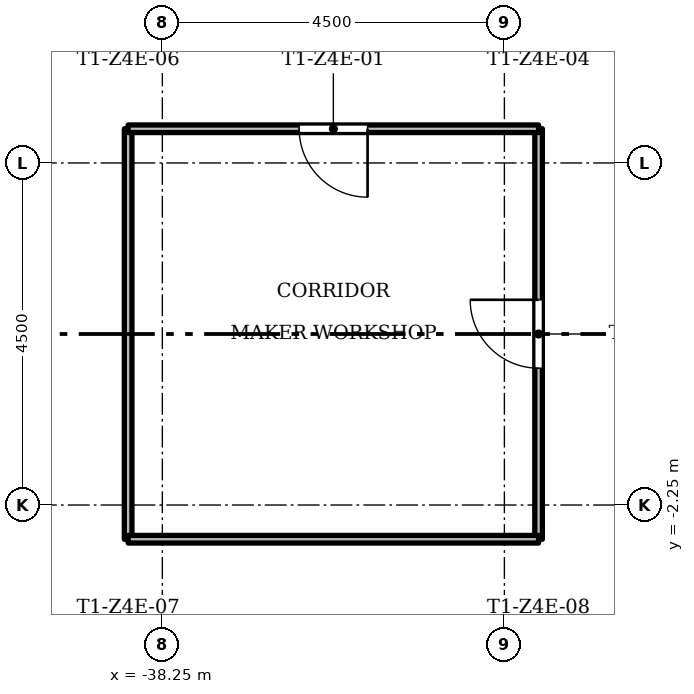
"""IFC4 building model, lengths in metres.
Left out: names, types, materials, properties, quantities, classifications, styles, units other than length and angle.
Written with IfcOpenShell. Run it as: python <this file> out.ifc"""

import sys

from ifc_helpers import new_model, si_unit, direction, frame, frame_2d, origin, place, context, subcontext, project, spatial, rectangle, extrude, element, fill, save


model = new_model("IFC4")
c1 = context("Model", 3, precision=1e-05, world=origin(), true_north=direction((0.0, 1.0)))
c2 = subcontext(c1, "Body", "Model", "MODEL_VIEW")
j1 = project(units=[si_unit("LENGTHUNIT", "METRE"), si_unit("PLANEANGLEUNIT", "RADIAN")], contexts=[c1])
p1 = place(None, origin())
s1 = spatial("IfcSite", under=j1, at=p1, CompositionType="ELEMENT")
p2 = place(p1, origin())
s2 = spatial("IfcBuilding", under=s1, at=p2, CompositionType="ELEMENT")
p3 = place(p2, frame((0.0, 0.0, 209.6)))
s3 = spatial("IfcBuildingStorey", under=s2, at=p3, CompositionType="ELEMENT", Elevation=209.6)
p4 = place(p3, frame((-38.7, -2.7, 0.0), z_axis=(0.0, 0.0, 1.0), x_axis=(0.0, 1.0, 0.0)))
e1 = element("IfcWall", 1, at=p4, inside=s3, PredefinedType="PARTITIONING", context=c2, shape_type="SweptSolid", body=[
    extrude(rectangle(XDim=5.4, YDim=0.1, at=frame_2d((2.7, 0.0))), origin(), (0.0, 0.0, 1.0), 3.0),
])
p5 = place(p3, frame((-33.3, -2.7, 0.0), z_axis=(0.0, 0.0, 1.0), x_axis=(0.0, 1.0, 0.0)))
e2 = element("IfcWall", 2, at=p5, inside=s3, PredefinedType="PARTITIONING", context=c2, shape_type="SweptSolid", body=[
    extrude(rectangle(XDim=5.4, YDim=0.1, at=frame_2d((2.7, 0.0))), origin(), (0.0, 0.0, 1.0), 3.0),
])
p6 = place(p5, frame((2.25, 0.0, 0.0)))
e3 = element("IfcOpeningElement", 3, at=p6, cuts=e2, PredefinedType="OPENING", context=c2, shape_type="SweptSolid", body=[
    extrude(rectangle(XDim=0.9, YDim=2.1, at=frame_2d((0.45, 1.05))), frame((0.0, 0.06, 0.0), z_axis=(0.0, -1.0, 0.0), x_axis=(1.0, 0.0, 0.0)), (0.0, 0.0, 1.0), 0.12),
])
p7 = place(p3, frame((-38.7, -2.7, 0.0), z_axis=(0.0, 0.0, 1.0), x_axis=(1.0, 0.0, 0.0)))
e4 = element("IfcWall", 4, at=p7, inside=s3, PredefinedType="PARTITIONING", context=c2, shape_type="SweptSolid", body=[
    extrude(rectangle(XDim=5.4, YDim=0.1, at=frame_2d((2.7, 0.0))), origin(), (0.0, 0.0, 1.0), 3.0),
])
p8 = place(p3, frame((-38.7, 2.7, 0.0), z_axis=(0.0, 0.0, 1.0), x_axis=(1.0, 0.0, 0.0)))
e5 = element("IfcWall", 5, at=p8, inside=s3, PredefinedType="PARTITIONING", context=c2, shape_type="SweptSolid", body=[
    extrude(rectangle(XDim=5.4, YDim=0.1, at=frame_2d((2.7, 0.0))), origin(), (0.0, 0.0, 1.0), 3.0),
])
p9 = place(p8, frame((2.25, 0.0, 0.0)))
e6 = element("IfcOpeningElement", 6, at=p9, cuts=e5, PredefinedType="OPENING", context=c2, shape_type="SweptSolid", body=[
    extrude(rectangle(XDim=0.9, YDim=2.1, at=frame_2d((0.45, 1.05))), frame((0.0, 0.06, 0.0), z_axis=(0.0, -1.0, 0.0), x_axis=(1.0, 0.0, 0.0)), (0.0, 0.0, 1.0), 0.12),
])
p10 = place(p9, origin())
e7 = element("IfcDoor", 7, at=p10, inside=s3, OperationType="SINGLE_SWING_RIGHT", PredefinedType="DOOR", context=c2, shape_type="SweptSolid", body=[
    extrude(rectangle(XDim=0.9, YDim=2.1, at=frame_2d((0.45, 1.05))), frame((0.0, 0.025, 0.0), z_axis=(0.0, -1.0, 0.0), x_axis=(1.0, 0.0, 0.0)), (0.0, 0.0, 1.0), 0.05),
])
fill(e6, e7)
p11 = place(p6, origin())
e8 = element("IfcDoor", 8, at=p11, inside=s3, OperationType="SINGLE_SWING_LEFT", PredefinedType="DOOR", context=c2, shape_type="SweptSolid", body=[
    extrude(rectangle(XDim=0.9, YDim=2.1, at=frame_2d((0.45, 1.05))), frame((0.0, 0.025, 0.0), z_axis=(0.0, -1.0, 0.0), x_axis=(1.0, 0.0, 0.0)), (0.0, 0.0, 1.0), 0.05),
])
fill(e3, e8)
save(model, sys.argv[1])
